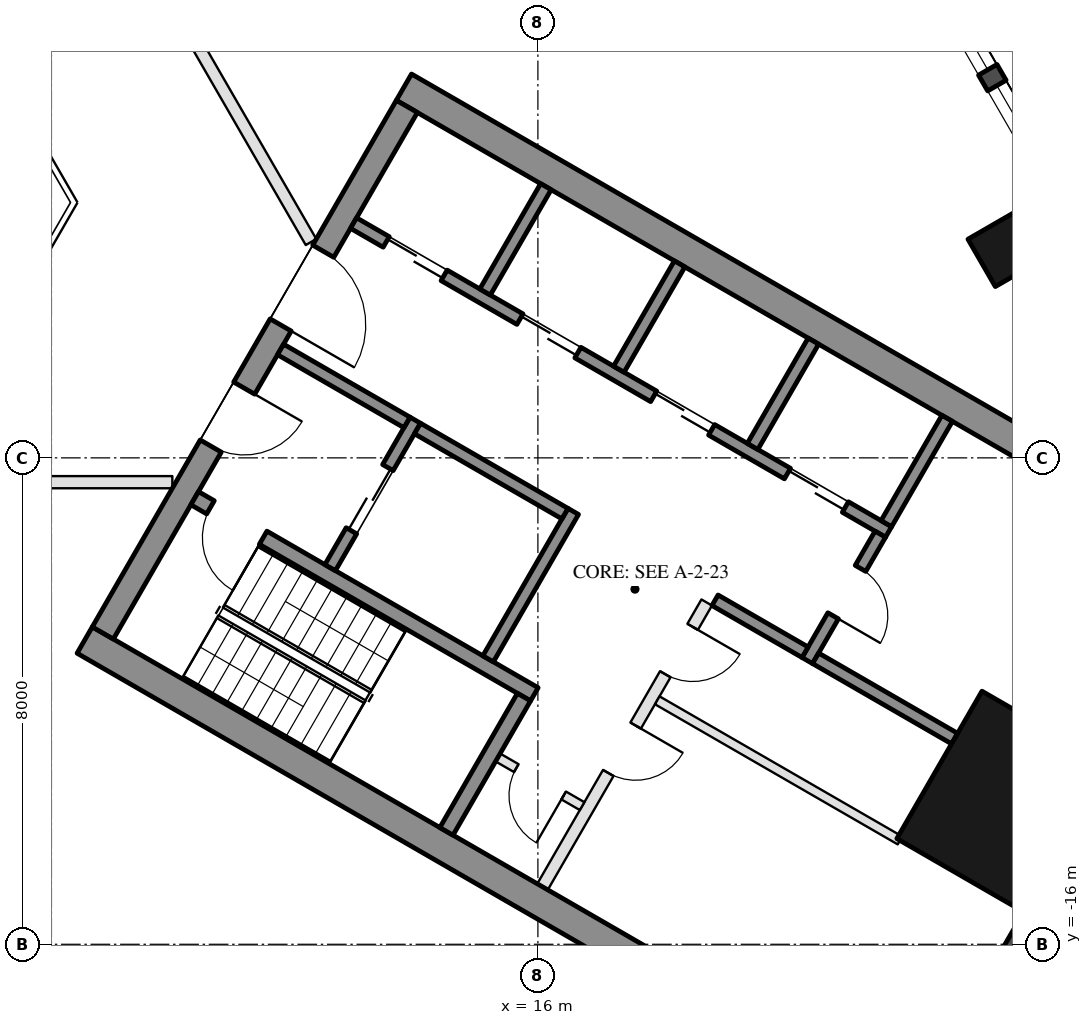
"""IFC4 building model, lengths in metres.
Left out: names, types, materials, properties, quantities, classifications, styles, units other than length and angle.
Written with IfcOpenShell. Run it as: python <this file> out.ifc"""

import sys

from ifc_helpers import new_model, si_unit, direction, frame, frame_2d, origin, origin_2d, place, context, subcontext, project, spatial, rectangle, hollow_rectangle, extrude, element, fill, save


model = new_model("IFC4")
c1 = context("Model", 3, precision=1e-05, world=origin(), true_north=direction((0.0, 1.0)))
c2 = subcontext(c1, "Body", "Model", "MODEL_VIEW")
j1 = project(units=[si_unit("LENGTHUNIT", "METRE"), si_unit("PLANEANGLEUNIT", "RADIAN")], contexts=[c1])
p1 = place(None, origin())
s1 = spatial("IfcSite", under=j1, at=p1, CompositionType="ELEMENT")
p2 = place(p1, origin())
s2 = spatial("IfcBuilding", under=s1, at=p2, CompositionType="ELEMENT")
p3 = place(p2, frame((0.0, 0.0, 105.7)))
s3 = spatial("IfcBuildingStorey", under=s2, at=p3, CompositionType="ELEMENT", Elevation=105.7)
p4 = place(p3, frame((23.688, -4.568, 0.0), z_axis=(0.0, 0.0, 1.0), x_axis=(-0.5, 0.866025403784, 0.0)))
e1 = element("IfcColumn", 1, at=p4, inside=s3, PredefinedType="COLUMN", context=c2, shape_type="SweptSolid", body=[
    extrude(hollow_rectangle(XDim=0.9, YDim=0.9, WallThickness=0.04, at=origin_2d()), origin(), (0.0, 0.0, 1.0), 3.7),
])
p5 = place(p3, frame((23.643, -13.65, 0.0), z_axis=(0.0, 0.0, 1.0), x_axis=(0.5, 0.866025403784, 0.0)))
e2 = element("IfcColumn", 2, at=p5, inside=s3, PredefinedType="COLUMN", context=c2, shape_type="SweptSolid", body=[
    extrude(hollow_rectangle(XDim=2.8, YDim=2.4, WallThickness=0.07, at=origin_2d()), origin(), (0.0, 0.0, 1.0), 3.7),
])
p6 = place(p3, frame((23.427, -16.792, 0.0), z_axis=(0.0, 0.0, 1.0), x_axis=(0.500018773155, 0.866014564827, 0.0)))
e3 = element("IfcWall", 3, at=p6, inside=s3, PredefinedType="SOLIDWALL", context=c2, shape_type="SweptSolid", body=[
    extrude(rectangle(XDim=5.658, YDim=0.35, at=frame_2d((2.829, 0.0))), origin(), (0.0, 0.0, 1.0), 3.55),
])
p7 = place(p3, frame((26.257, -6.567, 0.0), z_axis=(0.0, 0.0, 1.0), x_axis=(-0.500023526245, 0.866011820475, 0.0)))
e4 = element("IfcWall", 4, at=p7, inside=s3, PredefinedType="SOLIDWALL", context=c2, shape_type="SweptSolid", body=[
    extrude(rectangle(XDim=11.816, YDim=0.35, at=frame_2d((5.908, 0.0))), origin(), (0.0, 0.0, 1.0), 3.55),
])
p8 = place(p7, frame((0.38, 0.0, 0.3)))
e5 = element("IfcOpeningElement", 5, at=p8, cuts=e4, PredefinedType="OPENING", context=c2, shape_type="SweptSolid", body=[
    extrude(rectangle(XDim=1.8, YDim=2.65, at=frame_2d((0.9, 1.325))), frame((0.0, 0.185, 0.0), z_axis=(0.0, -1.0, 0.0), x_axis=(1.0, 0.0, 0.0)), (0.0, 0.0, 1.0), 0.37),
])
p9 = place(p7, frame((7.716, 0.0, 0.0)))
e6 = element("IfcOpeningElement", 6, at=p9, cuts=e4, PredefinedType="OPENING", context=c2, shape_type="SweptSolid", body=[
    extrude(rectangle(XDim=2.4, YDim=2.4, at=frame_2d((1.2, 1.2))), frame((0.0, 0.185, 0.0), z_axis=(0.0, -1.0, 0.0), x_axis=(1.0, 0.0, 0.0)), (0.0, 0.0, 1.0), 0.37),
])
p10 = place(p7, frame((3.816, 0.0, 0.3)))
e7 = element("IfcOpeningElement", 7, at=p10, cuts=e4, PredefinedType="OPENING", context=c2, shape_type="SweptSolid", body=[
    extrude(rectangle(XDim=1.6, YDim=2.65, at=frame_2d((0.8, 1.325))), frame((0.0, 0.185, 0.0), z_axis=(0.0, -1.0, 0.0), x_axis=(1.0, 0.0, 0.0)), (0.0, 0.0, 1.0), 0.37),
])
p11 = place(p7, frame((5.716, 0.0, 0.3)))
e8 = element("IfcOpeningElement", 8, at=p11, cuts=e4, PredefinedType="OPENING", context=c2, shape_type="SweptSolid", body=[
    extrude(rectangle(XDim=1.6, YDim=2.65, at=frame_2d((0.8, 1.325))), frame((0.0, 0.185, 0.0), z_axis=(0.0, -1.0, 0.0), x_axis=(1.0, 0.0, 0.0)), (0.0, 0.0, 1.0), 0.37),
])
for number, where, z_axis, x_axis in (
    (9, (8.547, -10.997, 0.0), (0.0, 0.0, 1.0), (0.866, -0.5, 0.0)),
    (10, (13.797, -1.903, 0.0), (0.0, 0.0, 1.0), (0.866, -0.5, 0.0)),
):
    element("IfcWall", number, at=place(p3, frame(where, z_axis=z_axis, x_axis=x_axis)), inside=s3, PredefinedType="SHEAR", context=c2, shape_type="SweptSolid", body=[
        extrude(rectangle(XDim=14.837, YDim=0.5, at=frame_2d((7.418, 0.0))), origin(), (0.0, 0.0, 1.0), 3.5),
    ])
p12 = place(p3, frame((8.845, -10.88, 0.0), z_axis=(0.0, 0.0, 1.0), x_axis=(0.500004234368, 0.866022959057, 0.0)))
e11 = element("IfcWall", 11, at=p12, inside=s3, PredefinedType="SHEAR", context=c2, shape_type="SweptSolid", body=[
    extrude(rectangle(XDim=10.0, YDim=0.4, at=frame_2d((5.0, 0.0))), origin(), (0.0, 0.0, 1.0), 3.5),
])
p13 = place(p12, frame((3.55, 0.0, 0.0)))
e12 = element("IfcOpeningElement", 12, at=p13, cuts=e11, PredefinedType="OPENING", context=c2, shape_type="SweptSolid", body=[
    extrude(rectangle(XDim=1.1, YDim=2.1, at=frame_2d((0.55, 1.05))), frame((0.0, 0.21, 0.0), z_axis=(0.0, -1.0, 0.0), x_axis=(1.0, 0.0, 0.0)), (0.0, 0.0, 1.0), 0.42),
])
p14 = place(p12, frame((5.85, 0.0, 0.0)))
e13 = element("IfcOpeningElement", 13, at=p14, cuts=e11, PredefinedType="OPENING", context=c2, shape_type="SweptSolid", body=[
    extrude(rectangle(XDim=1.4, YDim=2.1, at=frame_2d((0.7, 1.05))), frame((0.0, 0.21, 0.0), z_axis=(0.0, -1.0, 0.0), x_axis=(1.0, 0.0, 0.0)), (0.0, 0.0, 1.0), 0.42),
])
p15 = place(p3, frame((10.356, -8.664, 0.0), z_axis=(0.0, 0.0, 1.0), x_axis=(0.866028629588, -0.499994412703, 0.0)))
e14 = element("IfcWall", 14, at=p15, inside=s3, PredefinedType="SHEAR", context=c2, shape_type="SweptSolid", body=[
    extrude(rectangle(XDim=6.45, YDim=0.25, at=frame_2d((3.225, 0.0))), origin(), (0.0, 0.0, 1.0), 3.5),
])
p16 = place(p15, frame((0.3, 0.0, 0.0)))
e15 = element("IfcOpeningElement", 15, at=p16, cuts=e14, PredefinedType="OPENING", context=c2, shape_type="SweptSolid", body=[
    extrude(rectangle(XDim=1.0, YDim=2.1, at=frame_2d((0.5, 1.05))), frame((0.0, 0.135, 0.0), z_axis=(0.0, -1.0, 0.0), x_axis=(1.0, 0.0, 0.0)), (0.0, 0.0, 1.0), 0.27),
])
p17 = place(p3, frame((14.496, -14.143, 0.0), z_axis=(0.0, 0.0, 1.0), x_axis=(0.500062241894, 0.865989465428, 0.0)))
e16 = element("IfcWall", 16, at=p17, inside=s3, PredefinedType="SHEAR", context=c2, shape_type="SweptSolid", body=[
    extrude(rectangle(XDim=2.55, YDim=0.25, at=frame_2d((1.275, 0.0))), origin(), (0.0, 0.0, 1.0), 3.5),
])
p18 = place(p3, frame((15.181, -11.305, 0.0), z_axis=(0.0, 0.0, 1.0), x_axis=(0.49994636267, 0.866056369097, 0.0)))
e17 = element("IfcWall", 17, at=p18, inside=s3, PredefinedType="SHEAR", context=c2, shape_type="SweptSolid", body=[
    extrude(rectangle(XDim=2.8, YDim=0.2, at=frame_2d((1.4, 0.0))), origin(), (0.0, 0.0, 1.0), 3.5),
])
p19 = place(p3, frame((12.583, -9.805, 0.0), z_axis=(0.0, 0.0, 1.0), x_axis=(0.49994636267, 0.866056369097, 0.0)))
e18 = element("IfcWall", 18, at=p19, inside=s3, PredefinedType="SHEAR", context=c2, shape_type="SweptSolid", body=[
    extrude(rectangle(XDim=2.8, YDim=0.2, at=frame_2d((1.4, 0.0))), origin(), (0.0, 0.0, 1.0), 3.5),
])
p20 = place(p19, frame((0.7, 0.0, 0.0)))
e19 = element("IfcOpeningElement", 19, at=p20, cuts=e18, PredefinedType="OPENING", context=c2, shape_type="SweptSolid", body=[
    extrude(rectangle(XDim=1.2, YDim=2.1, at=frame_2d((0.6, 1.05))), frame((0.0, 0.11, 0.0), z_axis=(0.0, -1.0, 0.0), x_axis=(1.0, 0.0, 0.0)), (0.0, 0.0, 1.0), 0.22),
])
p21 = place(p3, frame((11.768, -6.217, 0.0), z_axis=(0.0, 0.0, 1.0), x_axis=(0.866050077142, -0.499957262057, 0.0)))
e20 = element("IfcWall", 20, at=p21, inside=s3, PredefinedType="SHEAR", context=c2, shape_type="SweptSolid", body=[
    extrude(rectangle(XDim=2.4, YDim=0.2, at=frame_2d((1.2, 0.0))), origin(), (0.0, 0.0, 1.0), 3.5),
])
p22 = place(p3, frame((14.02, -7.517, 0.0), z_axis=(0.0, 0.0, 1.0), x_axis=(0.866034573852, -0.49998411664, 0.0)))
e21 = element("IfcWall", 21, at=p22, inside=s3, PredefinedType="SHEAR", context=c2, shape_type="SweptSolid", body=[
    extrude(rectangle(XDim=2.8, YDim=0.2, at=frame_2d((1.4, 0.0))), origin(), (0.0, 0.0, 1.0), 3.5),
])
p23 = place(p3, frame((12.968, -4.138, 0.0), z_axis=(0.0, 0.0, 1.0), x_axis=(0.866028328073, -0.49999493495, 0.0)))
e22 = element("IfcWall", 22, at=p23, inside=s3, PredefinedType="SHEAR", context=c2, shape_type="SweptSolid", body=[
    extrude(rectangle(XDim=10.16, YDim=0.2, at=frame_2d((5.08, 0.0))), origin(), (0.0, 0.0, 1.0), 3.5),
])
p24 = place(p23, frame((0.62, 0.0, 0.0)))
e23 = element("IfcOpeningElement", 23, at=p24, cuts=e22, PredefinedType="OPENING", context=c2, shape_type="SweptSolid", body=[
    extrude(rectangle(XDim=1.1, YDim=2.1, at=frame_2d((0.55, 1.05))), frame((0.0, 0.11, 0.0), z_axis=(0.0, -1.0, 0.0), x_axis=(1.0, 0.0, 0.0)), (0.0, 0.0, 1.0), 0.22),
])
p25 = place(p23, frame((3.16, 0.0, 0.0)))
e24 = element("IfcOpeningElement", 24, at=p25, cuts=e22, PredefinedType="OPENING", context=c2, shape_type="SweptSolid", body=[
    extrude(rectangle(XDim=1.1, YDim=2.1, at=frame_2d((0.55, 1.05))), frame((0.0, 0.11, 0.0), z_axis=(0.0, -1.0, 0.0), x_axis=(1.0, 0.0, 0.0)), (0.0, 0.0, 1.0), 0.22),
])
p26 = place(p23, frame((5.7, 0.0, 0.0)))
e25 = element("IfcOpeningElement", 25, at=p26, cuts=e22, PredefinedType="OPENING", context=c2, shape_type="SweptSolid", body=[
    extrude(rectangle(XDim=1.1, YDim=2.1, at=frame_2d((0.55, 1.05))), frame((0.0, 0.11, 0.0), z_axis=(0.0, -1.0, 0.0), x_axis=(1.0, 0.0, 0.0)), (0.0, 0.0, 1.0), 0.22),
])
p27 = place(p23, frame((8.24, 0.0, 0.0)))
e26 = element("IfcOpeningElement", 26, at=p27, cuts=e22, PredefinedType="OPENING", context=c2, shape_type="SweptSolid", body=[
    extrude(rectangle(XDim=1.1, YDim=2.1, at=frame_2d((0.55, 1.05))), frame((0.0, 0.11, 0.0), z_axis=(0.0, -1.0, 0.0), x_axis=(1.0, 0.0, 0.0)), (0.0, 0.0, 1.0), 0.22),
])
p28 = place(p3, frame((20.43, -11.333, 0.0), z_axis=(0.0, 0.0, 1.0), x_axis=(0.500001309137, 0.866024647952, 0.0)))
e27 = element("IfcWall", 27, at=p28, inside=s3, PredefinedType="SHEAR", context=c2, shape_type="SweptSolid", body=[
    extrude(rectangle(XDim=2.4, YDim=0.2, at=frame_2d((1.2, 0.0))), origin(), (0.0, 0.0, 1.0), 3.5),
])
p29 = place(p28, frame((0.85, 0.0, 0.0)))
e28 = element("IfcOpeningElement", 28, at=p29, cuts=e27, PredefinedType="OPENING", context=c2, shape_type="SweptSolid", body=[
    extrude(rectangle(XDim=0.9, YDim=2.1, at=frame_2d((0.45, 1.05))), frame((0.0, 0.11, 0.0), z_axis=(0.0, -1.0, 0.0), x_axis=(1.0, 0.0, 0.0)), (0.0, 0.0, 1.0), 0.22),
])
p30 = place(p3, frame((18.913, -10.342, 0.0), z_axis=(0.0, 0.0, 1.0), x_axis=(0.866038183914, -0.499977863513, 0.0)))
e29 = element("IfcWall", 29, at=p30, inside=s3, PredefinedType="SHEAR", context=c2, shape_type="SweptSolid", body=[
    extrude(rectangle(XDim=1.71, YDim=0.2, at=frame_2d((0.855, 0.0))), origin(), (0.0, 0.0, 1.0), 3.5),
])
for number, where, z_axis, x_axis in (
    (30, (15.131, -5.272, 0.0), (0.0, 0.0, 1.0), (0.5, 0.866, 0.0)),
    (31, (17.331, -6.542, 0.0), (0.0, 0.0, 1.0), (0.5, 0.866, 0.0)),
    (32, (19.531, -7.812, 0.0), (0.0, 0.0, 1.0), (0.5, 0.866, 0.0)),
    (33, (21.73, -9.082, 0.0), (0.0, 0.0, 1.0), (0.5, 0.866, 0.0)),
):
    element("IfcWall", number, at=place(p3, frame(where, z_axis=z_axis, x_axis=x_axis)), inside=s3, PredefinedType="SHEAR", context=c2, shape_type="SweptSolid", body=[
        extrude(rectangle(XDim=2.0, YDim=0.2, at=frame_2d((1.0, 0.0))), origin(), (0.0, 0.0, 1.0), 3.5),
    ])
p31 = place(p3, frame((20.567, -11.297, 0.0), z_axis=(0.0, 0.0, 1.0), x_axis=(0.866060851709, -0.499938597367, 0.0)))
e34 = element("IfcWall", 34, at=p31, inside=s3, PredefinedType="SHEAR", context=c2, shape_type="SweptSolid", body=[
    extrude(rectangle(XDim=2.64, YDim=0.2, at=frame_2d((1.32, 0.0))), origin(), (0.0, 0.0, 1.0), 3.5),
])
p32 = place(p3, frame((16.076, -15.055, 0.0), z_axis=(0.0, 0.0, 1.0), x_axis=(0.499995103361, 0.866028230842, 0.0)))
e35 = element("IfcWall", 35, at=p32, inside=s3, PredefinedType="PARTITIONING", context=c2, shape_type="SweptSolid", body=[
    extrude(rectangle(XDim=5.4, YDim=0.2, at=frame_2d((2.7, 0.0))), origin(), (0.0, 0.0, 1.0), 3.5),
])
p33 = place(p32, frame((2.163, 0.0, 0.0)))
e36 = element("IfcOpeningElement", 36, at=p33, cuts=e35, PredefinedType="OPENING", context=c2, shape_type="SweptSolid", body=[
    extrude(rectangle(XDim=0.9, YDim=2.1, at=frame_2d((0.45, 1.05))), frame((0.0, 0.11, 0.0), z_axis=(0.0, -1.0, 0.0), x_axis=(1.0, 0.0, 0.0)), (0.0, 0.0, 1.0), 0.22),
])
p34 = place(p32, frame((4.038, 0.0, 0.0)))
e37 = element("IfcOpeningElement", 37, at=p34, cuts=e35, PredefinedType="OPENING", context=c2, shape_type="SweptSolid", body=[
    extrude(rectangle(XDim=0.9, YDim=2.1, at=frame_2d((0.45, 1.05))), frame((0.0, 0.11, 0.0), z_axis=(0.0, -1.0, 0.0), x_axis=(1.0, 0.0, 0.0)), (0.0, 0.0, 1.0), 0.22),
])
p35 = place(p3, frame((15.342, -12.928, 0.0), z_axis=(0.0, 0.0, 1.0), x_axis=(0.865989903783, -0.500061482766, 0.0)))
e38 = element("IfcWall", 38, at=p35, inside=s3, PredefinedType="PARTITIONING", context=c2, shape_type="SweptSolid", body=[
    extrude(rectangle(XDim=1.6, YDim=0.15, at=frame_2d((0.8, 0.0))), origin(), (0.0, 0.0, 1.0), 3.5),
])
p36 = place(p35, frame((0.35, 0.0, 0.0)))
e39 = element("IfcOpeningElement", 39, at=p36, cuts=e38, PredefinedType="OPENING", context=c2, shape_type="SweptSolid", body=[
    extrude(rectangle(XDim=0.9, YDim=2.1, at=frame_2d((0.45, 1.05))), frame((0.0, 0.085, 0.0), z_axis=(0.0, -1.0, 0.0), x_axis=(1.0, 0.0, 0.0)), (0.0, 0.0, 1.0), 0.17),
])
p37 = place(p3, frame((17.963, -11.987, 0.0), z_axis=(0.0, 0.0, 1.0), x_axis=(0.865998608524, -0.500046407882, 0.0)))
e40 = element("IfcWall", 40, at=p37, inside=s3, PredefinedType="PARTITIONING", context=c2, shape_type="SweptSolid", body=[
    extrude(rectangle(XDim=4.61, YDim=0.15, at=frame_2d((2.305, 0.0))), origin(), (0.0, 0.0, 1.0), 3.5),
])
p38 = place(p3, frame((9.988, -8.4, 0.0), z_axis=(0.0, 0.0, 1.0), x_axis=(-1.0, 0.0, 0.0)))
e41 = element("IfcWall", 41, at=p38, inside=s3, PredefinedType="PARTITIONING", context=c2, shape_type="SweptSolid", body=[
    extrude(rectangle(XDim=10.594, YDim=0.2, at=frame_2d((5.297, 0.0))), origin(), (0.0, 0.0, 1.0), 2.95),
])
p39 = place(p38, frame((4.797, 0.0, 0.0)))
e42 = element("IfcOpeningElement", 42, at=p39, cuts=e41, PredefinedType="OPENING", context=c2, shape_type="SweptSolid", body=[
    extrude(rectangle(XDim=1.0, YDim=2.1, at=frame_2d((0.5, 1.05))), frame((0.0, 0.11, 0.0), z_axis=(0.0, -1.0, 0.0), x_axis=(1.0, 0.0, 0.0)), (0.0, 0.0, 1.0), 0.22),
])
p40 = place(p3, frame((7.577, 3.676, 0.0), z_axis=(0.0, 0.0, 1.0), x_axis=(0.500017489778, -0.866015305821, 0.0)))
e43 = element("IfcWall", 43, at=p40, inside=s3, PredefinedType="PARTITIONING", context=c2, shape_type="SweptSolid", body=[
    extrude(rectangle(XDim=9.384, YDim=0.2, at=frame_2d((4.692, 0.0))), origin(), (0.0, 0.0, 1.0), 2.95),
])
p41 = place(p40, frame((4.192, 0.0, 0.0)))
e44 = element("IfcOpeningElement", 44, at=p41, cuts=e43, PredefinedType="OPENING", context=c2, shape_type="SweptSolid", body=[
    extrude(rectangle(XDim=1.0, YDim=2.1, at=frame_2d((0.5, 1.05))), frame((0.0, 0.11, 0.0), z_axis=(0.0, -1.0, 0.0), x_axis=(1.0, 0.0, 0.0)), (0.0, 0.0, 1.0), 0.22),
])
p42 = place(p10, origin())
e45 = element("IfcWindow", 45, at=p42, inside=s3, PartitioningType="SINGLE_PANEL", PredefinedType="WINDOW", context=c2, shape_type="SweptSolid", body=[
    extrude(rectangle(XDim=1.6, YDim=2.65, at=frame_2d((0.8, 1.325))), frame((0.0, 0.03, 0.0), z_axis=(0.0, -1.0, 0.0), x_axis=(1.0, 0.0, 0.0)), (0.0, 0.0, 1.0), 0.06),
])
fill(e7, e45)
p43 = place(p11, origin())
e46 = element("IfcWindow", 46, at=p43, inside=s3, PartitioningType="SINGLE_PANEL", PredefinedType="WINDOW", context=c2, shape_type="SweptSolid", body=[
    extrude(rectangle(XDim=1.6, YDim=2.65, at=frame_2d((0.8, 1.325))), frame((0.0, 0.03, 0.0), z_axis=(0.0, -1.0, 0.0), x_axis=(1.0, 0.0, 0.0)), (0.0, 0.0, 1.0), 0.06),
])
fill(e8, e46)
p44 = place(p20, origin())
e47 = element("IfcDoor", 47, at=p44, inside=s3, OperationType="DOUBLE_DOOR_SLIDING", PredefinedType="DOOR", context=c2, shape_type="SweptSolid", body=[
    extrude(rectangle(XDim=1.2, YDim=2.1, at=frame_2d((0.6, 1.05))), frame((0.0, 0.025, 0.0), z_axis=(0.0, -1.0, 0.0), x_axis=(1.0, 0.0, 0.0)), (0.0, 0.0, 1.0), 0.05),
])
fill(e19, e47)
p45 = place(p36, frame((0.9, 0.0, 0.0), z_axis=(0.0, 0.0, 1.0), x_axis=(-1.0, 0.0, 0.0)))
e48 = element("IfcDoor", 48, at=p45, inside=s3, OperationType="SINGLE_SWING_LEFT", PredefinedType="DOOR", context=c2, shape_type="SweptSolid", body=[
    extrude(rectangle(XDim=0.9, YDim=2.1, at=frame_2d((0.45, 1.05))), frame((0.0, 0.025, 0.0), z_axis=(0.0, -1.0, 0.0), x_axis=(1.0, 0.0, 0.0)), (0.0, 0.0, 1.0), 0.05),
])
fill(e39, e48)
p46 = place(p24, origin())
e49 = element("IfcDoor", 49, at=p46, inside=s3, OperationType="DOUBLE_DOOR_SLIDING", PredefinedType="DOOR", context=c2, shape_type="SweptSolid", body=[
    extrude(rectangle(XDim=1.1, YDim=2.1, at=frame_2d((0.55, 1.05))), frame((0.0, 0.025, 0.0), z_axis=(0.0, -1.0, 0.0), x_axis=(1.0, 0.0, 0.0)), (0.0, 0.0, 1.0), 0.05),
])
fill(e23, e49)
p47 = place(p25, origin())
e50 = element("IfcDoor", 50, at=p47, inside=s3, OperationType="DOUBLE_DOOR_SLIDING", PredefinedType="DOOR", context=c2, shape_type="SweptSolid", body=[
    extrude(rectangle(XDim=1.1, YDim=2.1, at=frame_2d((0.55, 1.05))), frame((0.0, 0.025, 0.0), z_axis=(0.0, -1.0, 0.0), x_axis=(1.0, 0.0, 0.0)), (0.0, 0.0, 1.0), 0.05),
])
fill(e24, e50)
p48 = place(p26, origin())
e51 = element("IfcDoor", 51, at=p48, inside=s3, OperationType="DOUBLE_DOOR_SLIDING", PredefinedType="DOOR", context=c2, shape_type="SweptSolid", body=[
    extrude(rectangle(XDim=1.1, YDim=2.1, at=frame_2d((0.55, 1.05))), frame((0.0, 0.025, 0.0), z_axis=(0.0, -1.0, 0.0), x_axis=(1.0, 0.0, 0.0)), (0.0, 0.0, 1.0), 0.05),
])
fill(e25, e51)
p49 = place(p27, origin())
e52 = element("IfcDoor", 52, at=p49, inside=s3, OperationType="DOUBLE_DOOR_SLIDING", PredefinedType="DOOR", context=c2, shape_type="SweptSolid", body=[
    extrude(rectangle(XDim=1.1, YDim=2.1, at=frame_2d((0.55, 1.05))), frame((0.0, 0.025, 0.0), z_axis=(0.0, -1.0, 0.0), x_axis=(1.0, 0.0, 0.0)), (0.0, 0.0, 1.0), 0.05),
])
fill(e26, e52)
p50 = place(p29, frame((0.9, 0.0, 0.0), z_axis=(0.0, 0.0, 1.0), x_axis=(-1.0, 0.0, 0.0)))
e53 = element("IfcDoor", 53, at=p50, inside=s3, OperationType="SINGLE_SWING_RIGHT", PredefinedType="DOOR", context=c2, shape_type="SweptSolid", body=[
    extrude(rectangle(XDim=0.9, YDim=2.1, at=frame_2d((0.45, 1.05))), frame((0.0, 0.025, 0.0), z_axis=(0.0, -1.0, 0.0), x_axis=(1.0, 0.0, 0.0)), (0.0, 0.0, 1.0), 0.05),
])
fill(e28, e53)
p51 = place(p33, frame((0.9, 0.0, 0.0), z_axis=(0.0, 0.0, 1.0), x_axis=(-1.0, 0.0, 0.0)))
e54 = element("IfcDoor", 54, at=p51, inside=s3, OperationType="SINGLE_SWING_LEFT", PredefinedType="DOOR", context=c2, shape_type="SweptSolid", body=[
    extrude(rectangle(XDim=0.9, YDim=2.1, at=frame_2d((0.45, 1.05))), frame((0.0, 0.025, 0.0), z_axis=(0.0, -1.0, 0.0), x_axis=(1.0, 0.0, 0.0)), (0.0, 0.0, 1.0), 0.05),
])
fill(e36, e54)
p52 = place(p34, frame((0.9, 0.0, 0.0), z_axis=(0.0, 0.0, 1.0), x_axis=(-1.0, 0.0, 0.0)))
e55 = element("IfcDoor", 55, at=p52, inside=s3, OperationType="SINGLE_SWING_LEFT", PredefinedType="DOOR", context=c2, shape_type="SweptSolid", body=[
    extrude(rectangle(XDim=0.9, YDim=2.1, at=frame_2d((0.45, 1.05))), frame((0.0, 0.025, 0.0), z_axis=(0.0, -1.0, 0.0), x_axis=(1.0, 0.0, 0.0)), (0.0, 0.0, 1.0), 0.05),
])
fill(e37, e55)
p53 = place(p13, frame((1.1, 0.0, 0.0), z_axis=(0.0, 0.0, 1.0), x_axis=(-1.0, 0.0, 0.0)))
e56 = element("IfcDoor", 56, at=p53, inside=s3, OperationType="SINGLE_SWING_LEFT", PredefinedType="DOOR", context=c2, shape_type="SweptSolid", body=[
    extrude(rectangle(XDim=1.1, YDim=2.1, at=frame_2d((0.55, 1.05))), frame((0.0, 0.025, 0.0), z_axis=(0.0, -1.0, 0.0), x_axis=(1.0, 0.0, 0.0)), (0.0, 0.0, 1.0), 0.05),
])
fill(e12, e56)
p54 = place(p14, frame((1.4, 0.0, 0.0), z_axis=(0.0, 0.0, 1.0), x_axis=(-1.0, 0.0, 0.0)))
e57 = element("IfcDoor", 57, at=p54, inside=s3, OperationType="DOUBLE_DOOR_SINGLE_SWING", PredefinedType="DOOR", context=c2, shape_type="SweptSolid", body=[
    extrude(rectangle(XDim=1.4, YDim=2.1, at=frame_2d((0.7, 1.05))), frame((0.0, 0.025, 0.0), z_axis=(0.0, -1.0, 0.0), x_axis=(1.0, 0.0, 0.0)), (0.0, 0.0, 1.0), 0.05),
])
fill(e13, e57)
p55 = place(p16, frame((1.0, 0.0, 0.0), z_axis=(0.0, 0.0, 1.0), x_axis=(-1.0, 0.0, 0.0)))
e58 = element("IfcDoor", 58, at=p55, inside=s3, OperationType="SINGLE_SWING_LEFT", PredefinedType="DOOR", context=c2, shape_type="SweptSolid", body=[
    extrude(rectangle(XDim=1.0, YDim=2.1, at=frame_2d((0.5, 1.05))), frame((0.0, 0.025, 0.0), z_axis=(0.0, -1.0, 0.0), x_axis=(1.0, 0.0, 0.0)), (0.0, 0.0, 1.0), 0.05),
])
fill(e15, e58)
save(model, sys.argv[1])
